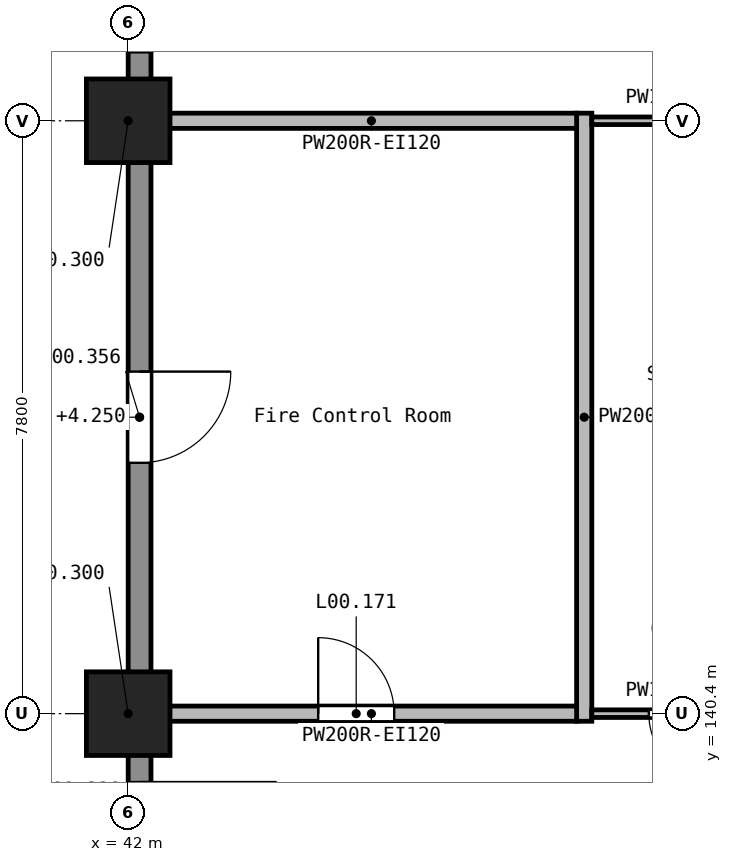
"""IFC4 building model, lengths in metres.
Left out: names, types, materials, properties, quantities, classifications, styles, units other than length and angle.
Written with IfcOpenShell. Run it as: python <this file> out.ifc"""

import sys

from ifc_helpers import new_model, si_unit, direction, frame, frame_2d, origin, origin_2d, place, context, subcontext, project, spatial, rectangle, extrude, element, fill, save


model = new_model("IFC4")
c1 = context("Model", 3, precision=1e-05, world=origin(), true_north=direction((0.0, 1.0)))
c2 = subcontext(c1, "Body", "Model", "MODEL_VIEW")
j1 = project(units=[si_unit("LENGTHUNIT", "METRE"), si_unit("PLANEANGLEUNIT", "RADIAN")], contexts=[c1])
p1 = place(None, origin())
s1 = spatial("IfcSite", under=j1, at=p1, CompositionType="ELEMENT")
p2 = place(p1, origin())
s2 = spatial("IfcBuilding", under=s1, at=p2, CompositionType="ELEMENT")
p3 = place(p2, origin())
s3 = spatial("IfcBuildingStorey", under=s2, at=p3, CompositionType="ELEMENT", Elevation=0.0)
for number, where, z_axis, x_axis in (
    (1, (42.0, 140.4, -0.3), (0.0, 0.0, 1.0), (1.0, 0.0, 0.0)),
    (2, (42.0, 148.2, -0.3), (0.0, 0.0, 1.0), (1.0, 0.0, 0.0)),
):
    element("IfcColumn", number, at=place(p3, frame(where, z_axis=z_axis, x_axis=x_axis)), inside=s3, PredefinedType="COLUMN", context=c2, shape_type="SweptSolid", body=[
        extrude(rectangle(XDim=1.1, YDim=1.1, at=origin_2d()), origin(), (0.0, 0.0, 1.0), 5.7),
    ])
p4 = place(p3, frame((42.15, 151.3, 0.0), z_axis=(0.0, 0.0, 1.0), x_axis=(0.0, -1.0, 0.0)))
e3 = element("IfcWall", 3, at=p4, inside=s3, PredefinedType="STANDARD", context=c2, shape_type="SweptSolid", body=[
    extrude(rectangle(XDim=2.6, YDim=0.3, at=frame_2d((1.3, 0.0))), origin(), (0.0, 0.0, 1.0), 4.25),
])
p5 = place(p4, frame((0.4, 0.0, 0.0)))
e4 = element("IfcOpeningElement", 4, at=p5, cuts=e3, PredefinedType="OPENING", context=c2, shape_type="SweptSolid", body=[
    extrude(rectangle(XDim=1.8, YDim=2.1, at=frame_2d((0.9, 1.05))), frame((0.0, 0.16, 0.0), z_axis=(0.0, -1.0, 0.0), x_axis=(1.0, 0.0, 0.0)), (0.0, 0.0, 1.0), 0.32),
])
p6 = place(p3, frame((42.15, 147.7, 0.0), z_axis=(0.0, 0.0, 1.0), x_axis=(0.0, -1.0, 0.0)))
e5 = element("IfcWall", 5, at=p6, inside=s3, PredefinedType="STANDARD", context=c2, shape_type="SweptSolid", body=[
    extrude(rectangle(XDim=6.8, YDim=0.3, at=frame_2d((3.4, 0.0))), origin(), (0.0, 0.0, 1.0), 4.25),
])
p7 = place(p6, frame((2.8, 0.0, 0.0)))
e6 = element("IfcOpeningElement", 6, at=p7, cuts=e5, PredefinedType="OPENING", context=c2, shape_type="SweptSolid", body=[
    extrude(rectangle(XDim=1.2, YDim=2.1, at=frame_2d((0.6, 1.05))), frame((0.0, 0.16, 0.0), z_axis=(0.0, -1.0, 0.0), x_axis=(1.0, 0.0, 0.0)), (0.0, 0.0, 1.0), 0.32),
])
p8 = place(p3, frame((42.15, 139.9, 0.0), z_axis=(0.0, 0.0, 1.0), x_axis=(0.0, -1.0, 0.0)))
e7 = element("IfcWall", 7, at=p8, inside=s3, PredefinedType="STANDARD", context=c2, shape_type="SweptSolid", body=[
    extrude(rectangle(XDim=2.65, YDim=0.3, at=frame_2d((1.325, 0.0))), origin(), (0.0, 0.0, 1.0), 4.25),
])
p9 = place(p8, frame((0.4, 0.0, 0.0)))
e8 = element("IfcOpeningElement", 8, at=p9, cuts=e7, PredefinedType="OPENING", context=c2, shape_type="SweptSolid", body=[
    extrude(rectangle(XDim=1.8, YDim=2.1, at=frame_2d((0.9, 1.05))), frame((0.0, 0.16, 0.0), z_axis=(0.0, -1.0, 0.0), x_axis=(1.0, 0.0, 0.0)), (0.0, 0.0, 1.0), 0.32),
])
p10 = place(p3, frame((48.0, 140.3, 0.0), z_axis=(0.0, 0.0, 1.0), x_axis=(0.0, 1.0, 0.0)))
e9 = element("IfcWall", 9, at=p10, inside=s3, PredefinedType="SOLIDWALL", context=c2, shape_type="SweptSolid", body=[
    extrude(rectangle(XDim=8.0, YDim=0.2, at=frame_2d((4.0, 0.0))), origin(), (0.0, 0.0, 1.0), 5.05),
])
p11 = place(p3, frame((42.5, 140.4, 0.0), z_axis=(0.0, 0.0, 1.0), x_axis=(1.0, 0.0, 0.0)))
e10 = element("IfcWall", 10, at=p11, inside=s3, PredefinedType="SOLIDWALL", context=c2, shape_type="SweptSolid", body=[
    extrude(rectangle(XDim=5.4, YDim=0.2, at=frame_2d((2.7, 0.0))), origin(), (0.0, 0.0, 1.0), 5.05),
])
p12 = place(p11, frame((2.0, 0.0, 0.0)))
e11 = element("IfcOpeningElement", 11, at=p12, cuts=e10, PredefinedType="OPENING", context=c2, shape_type="SweptSolid", body=[
    extrude(rectangle(XDim=1.0, YDim=2.1, at=frame_2d((0.5, 1.05))), frame((0.0, 0.11, 0.0), z_axis=(0.0, -1.0, 0.0), x_axis=(1.0, 0.0, 0.0)), (0.0, 0.0, 1.0), 0.22),
])
p13 = place(p3, frame((42.5, 148.2, 0.0), z_axis=(0.0, 0.0, 1.0), x_axis=(1.0, 0.0, 0.0)))
e12 = element("IfcWall", 12, at=p13, inside=s3, PredefinedType="SOLIDWALL", context=c2, shape_type="SweptSolid", body=[
    extrude(rectangle(XDim=5.4, YDim=0.2, at=frame_2d((2.7, 0.0))), origin(), (0.0, 0.0, 1.0), 5.05),
])
p14 = place(p3, frame((49.9, 140.4, 0.0), z_axis=(0.0, 0.0, 1.0), x_axis=(-1.0, 0.0, 0.0)))
e13 = element("IfcWall", 13, at=p14, inside=s3, PredefinedType="PARTITIONING", context=c2, shape_type="SweptSolid", body=[
    extrude(rectangle(XDim=1.8, YDim=0.1, at=frame_2d((0.9, 0.0))), origin(), (0.0, 0.0, 1.0), 5.05),
])
p15 = place(p14, frame((0.15, 0.0, 0.0)))
e14 = element("IfcOpeningElement", 14, at=p15, cuts=e13, PredefinedType="OPENING", context=c2, shape_type="SweptSolid", body=[
    extrude(rectangle(XDim=0.9, YDim=2.1, at=frame_2d((0.45, 1.05))), frame((0.0, 0.06, 0.0), z_axis=(0.0, -1.0, 0.0), x_axis=(1.0, 0.0, 0.0)), (0.0, 0.0, 1.0), 0.12),
])
p16 = place(p3, frame((49.9, 148.2, 0.0), z_axis=(0.0, 0.0, 1.0), x_axis=(-1.0, 0.0, 0.0)))
e15 = element("IfcWall", 15, at=p16, inside=s3, PredefinedType="PARTITIONING", context=c2, shape_type="SweptSolid", body=[
    extrude(rectangle(XDim=1.8, YDim=0.1, at=frame_2d((0.9, 0.0))), origin(), (0.0, 0.0, 1.0), 5.05),
])
p17 = place(p7, frame((1.2, 0.0, 0.0), z_axis=(0.0, 0.0, 1.0), x_axis=(-1.0, 0.0, 0.0)))
e16 = element("IfcDoor", 16, at=p17, inside=s3, OperationType="SINGLE_SWING_LEFT", PredefinedType="DOOR", context=c2, shape_type="SweptSolid", body=[
    extrude(rectangle(XDim=1.2, YDim=2.1, at=frame_2d((0.6, 1.05))), frame((0.0, 0.025, 0.0), z_axis=(0.0, -1.0, 0.0), x_axis=(1.0, 0.0, 0.0)), (0.0, 0.0, 1.0), 0.05),
])
fill(e6, e16)
p18 = place(p5, frame((1.8, 0.0, 0.0), z_axis=(0.0, 0.0, 1.0), x_axis=(-1.0, 0.0, 0.0)))
e17 = element("IfcDoor", 17, at=p18, inside=s3, OperationType="SINGLE_SWING_LEFT", PredefinedType="DOOR", context=c2, shape_type="SweptSolid", body=[
    extrude(rectangle(XDim=1.8, YDim=2.1, at=frame_2d((0.9, 1.05))), frame((0.0, 0.025, 0.0), z_axis=(0.0, -1.0, 0.0), x_axis=(1.0, 0.0, 0.0)), (0.0, 0.0, 1.0), 0.05),
])
fill(e4, e17)
p19 = place(p12, origin())
e18 = element("IfcDoor", 18, at=p19, inside=s3, OperationType="SINGLE_SWING_LEFT", PredefinedType="DOOR", context=c2, shape_type="SweptSolid", body=[
    extrude(rectangle(XDim=1.0, YDim=2.1, at=frame_2d((0.5, 1.05))), frame((0.0, 0.025, 0.0), z_axis=(0.0, -1.0, 0.0), x_axis=(1.0, 0.0, 0.0)), (0.0, 0.0, 1.0), 0.05),
])
fill(e11, e18)
p20 = place(p15, frame((0.9, 0.0, 0.0), z_axis=(0.0, 0.0, 1.0), x_axis=(-1.0, 0.0, 0.0)))
e19 = element("IfcDoor", 19, at=p20, inside=s3, OperationType="SINGLE_SWING_RIGHT", PredefinedType="DOOR", context=c2, shape_type="SweptSolid", body=[
    extrude(rectangle(XDim=0.9, YDim=2.1, at=frame_2d((0.45, 1.05))), frame((0.0, 0.025, 0.0), z_axis=(0.0, -1.0, 0.0), x_axis=(1.0, 0.0, 0.0)), (0.0, 0.0, 1.0), 0.05),
])
fill(e14, e19)
save(model, sys.argv[1])
